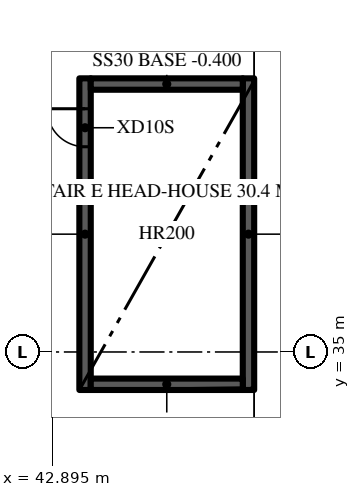
"""IFC4 building model, lengths in metres.
Left out: names, types, materials, properties, quantities, classifications, styles, units other than length and angle.
Written with IfcOpenShell. Run it as: python <this file> out.ifc"""

import sys

from ifc_helpers import new_model, si_unit, direction, frame, frame_2d, origin, place, context, subcontext, project, spatial, rectangle, extrude, element, fill, save


model = new_model("IFC4")
c1 = context("Model", 3, precision=1e-05, world=origin(), true_north=direction((0.0, 1.0)))
c2 = subcontext(c1, "Body", "Model", "MODEL_VIEW")
j1 = project(units=[si_unit("LENGTHUNIT", "METRE"), si_unit("PLANEANGLEUNIT", "RADIAN")], contexts=[c1])
p1 = place(None, origin())
s1 = spatial("IfcSite", under=j1, at=p1, CompositionType="ELEMENT")
p2 = place(p1, origin())
s2 = spatial("IfcBuilding", under=s1, at=p2, CompositionType="ELEMENT")
p3 = place(p2, origin())
s3 = spatial("IfcBuildingStorey", under=s2, at=p3, CompositionType="ELEMENT", Elevation=0.0)
p4 = place(p3, frame((43.75, 42.2, -0.4), z_axis=(0.0, 0.0, 1.0), x_axis=(0.0, -1.0, 0.0)))
e1 = element("IfcWall", 1, at=p4, inside=s3, PredefinedType="SOLIDWALL", context=c2, shape_type="SweptSolid", body=[
    extrude(rectangle(XDim=8.2, YDim=0.3, at=frame_2d((4.1, 0.0))), origin(), (0.0, 0.0, 1.0), 3.6),
])
p5 = place(p4, frame((0.8, 0.0, 0.4)))
e2 = element("IfcOpeningElement", 2, at=p5, cuts=e1, PredefinedType="OPENING", context=c2, shape_type="SweptSolid", body=[
    extrude(rectangle(XDim=1.0, YDim=2.2, at=frame_2d((0.5, 1.1))), frame((0.0, 0.16, 0.0), z_axis=(0.0, -1.0, 0.0), x_axis=(1.0, 0.0, 0.0)), (0.0, 0.0, 1.0), 0.32),
])
p6 = place(p3, frame((48.05, 34.0, -0.4), z_axis=(0.0, 0.0, 1.0), x_axis=(0.0, 1.0, 0.0)))
e3 = element("IfcWall", 3, at=p6, inside=s3, PredefinedType="SOLIDWALL", context=c2, shape_type="SweptSolid", body=[
    extrude(rectangle(XDim=8.2, YDim=0.3, at=frame_2d((4.1, 0.0))), origin(), (0.0, 0.0, 1.0), 3.6),
])
for number, where, z_axis, x_axis in (
    (4, (43.9, 42.05, -0.4), (0.0, 0.0, 1.0), (1.0, 0.0, 0.0)),
    (5, (47.9, 34.15, -0.4), (0.0, 0.0, 1.0), (-1.0, 0.0, 0.0)),
):
    element("IfcWall", number, at=place(p3, frame(where, z_axis=z_axis, x_axis=x_axis)), inside=s3, PredefinedType="SOLIDWALL", context=c2, shape_type="SweptSolid", body=[
        extrude(rectangle(XDim=4.0, YDim=0.3, at=frame_2d((2.0, 0.0))), origin(), (0.0, 0.0, 1.0), 3.6),
    ])
p7 = place(p5, frame((1.0, 0.0, 0.0), z_axis=(0.0, 0.0, 1.0), x_axis=(-1.0, 0.0, 0.0)))
e6 = element("IfcDoor", 6, at=p7, inside=s3, OperationType="SINGLE_SWING_RIGHT", PredefinedType="DOOR", context=c2, shape_type="SweptSolid", body=[
    extrude(rectangle(XDim=1.0, YDim=2.2, at=frame_2d((0.5, 1.1))), frame((0.0, 0.025, 0.0), z_axis=(0.0, -1.0, 0.0), x_axis=(1.0, 0.0, 0.0)), (0.0, 0.0, 1.0), 0.05),
])
fill(e2, e6)
save(model, sys.argv[1])
